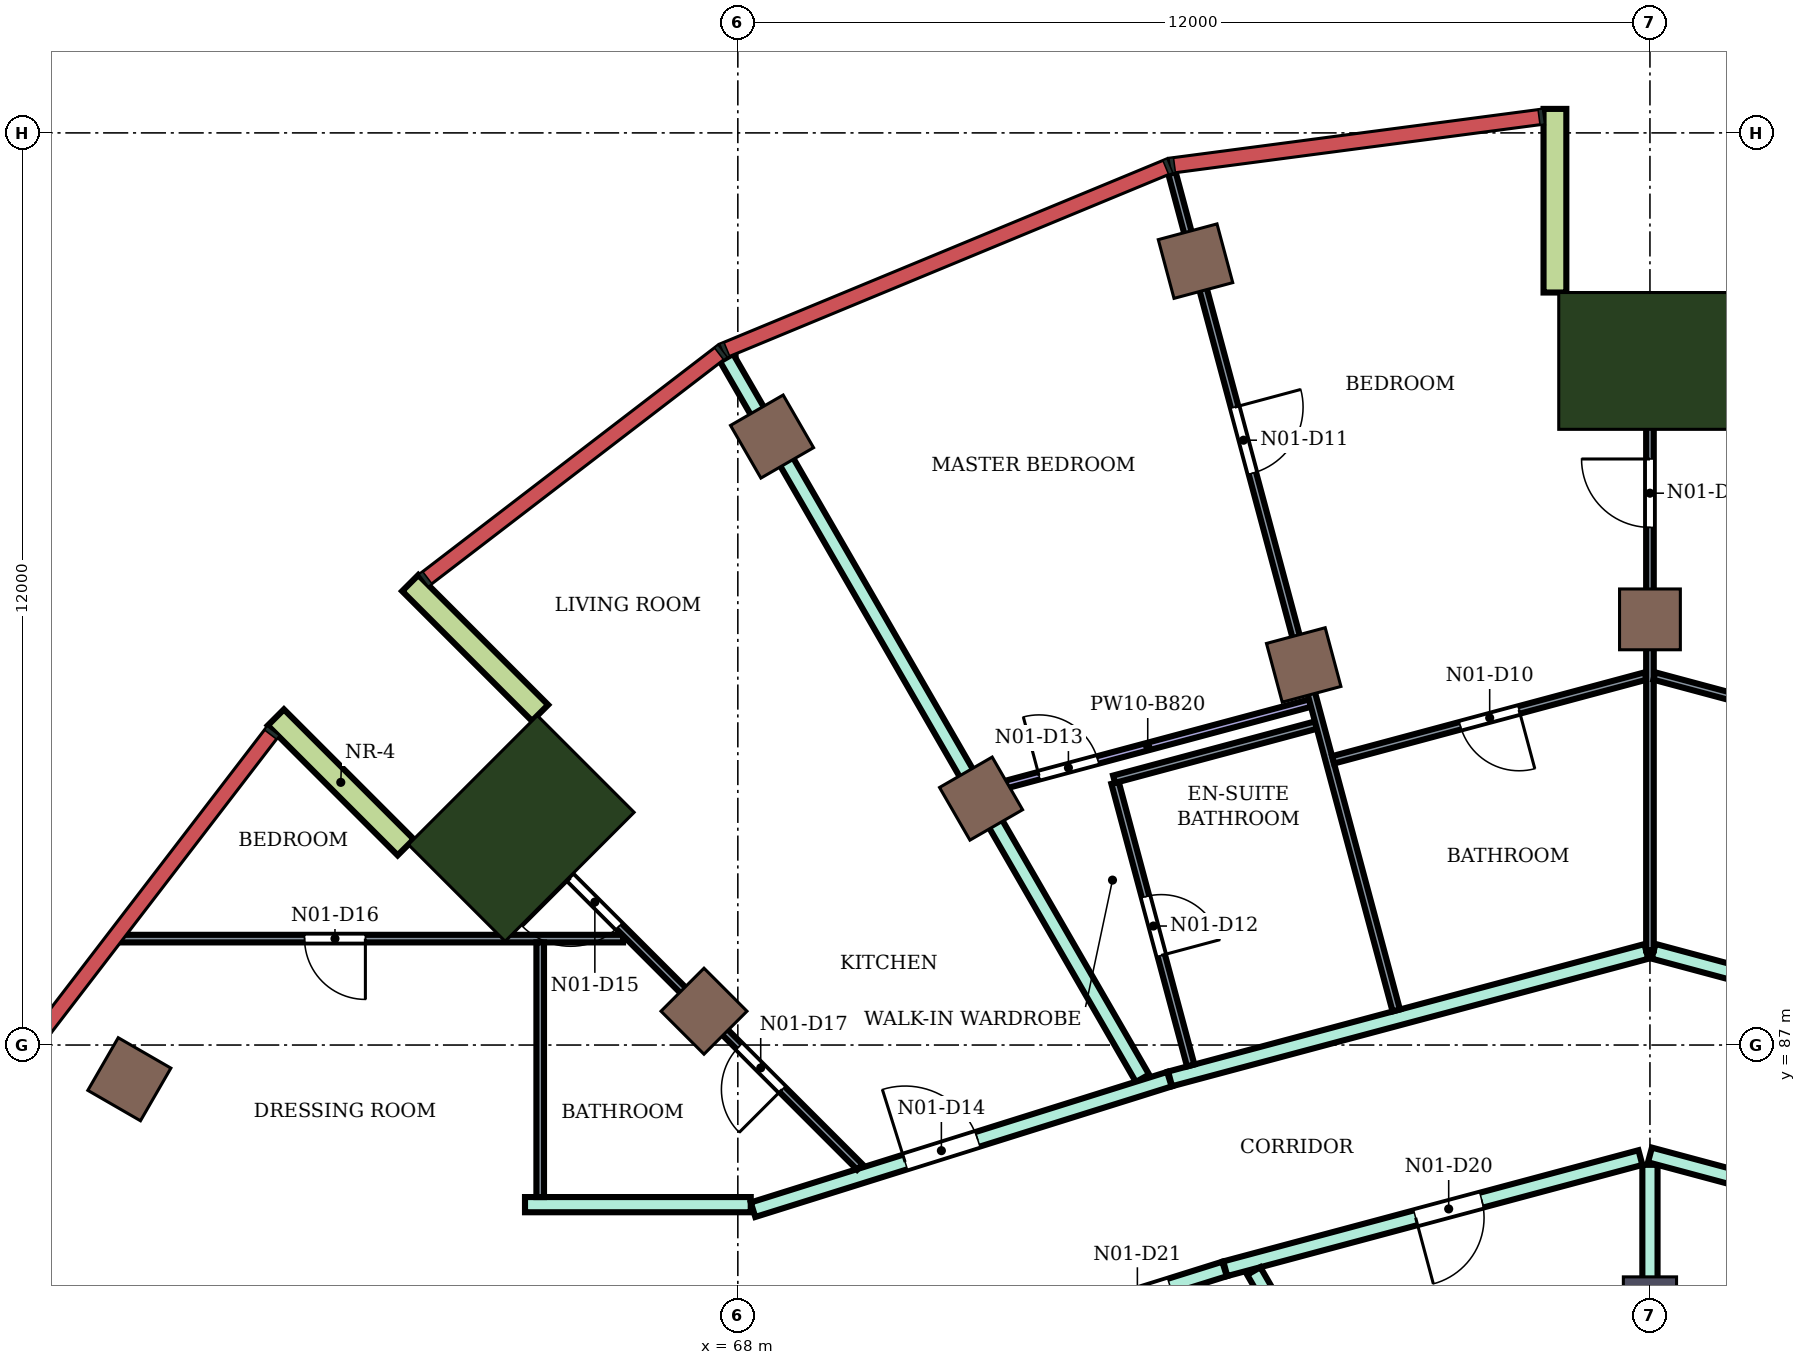
"""IFC4 building model, lengths in metres.
Left out: names, types, materials, properties, quantities, classifications, styles, units other than length and angle.
Written with IfcOpenShell. Run it as: python <this file> out.ifc"""

import sys

from ifc_helpers import new_model, si_unit, direction, frame, frame_2d, origin, origin_2d, place, context, subcontext, project, spatial, rectangle, extrude, element, fill, save


model = new_model("IFC4")
c1 = context("Model", 3, precision=1e-05, world=origin(), true_north=direction((0.0, 1.0)))
c2 = subcontext(c1, "Body", "Model", "MODEL_VIEW")
j1 = project(units=[si_unit("LENGTHUNIT", "METRE"), si_unit("PLANEANGLEUNIT", "RADIAN")], contexts=[c1])
p1 = place(None, origin())
s1 = spatial("IfcSite", under=j1, at=p1, CompositionType="ELEMENT")
p2 = place(p1, origin())
s2 = spatial("IfcBuilding", under=s1, at=p2, CompositionType="ELEMENT")
p3 = place(p2, frame((0.0, 0.0, 284.1)))
s3 = spatial("IfcBuildingStorey", under=s2, at=p3, CompositionType="ELEMENT", Elevation=284.1)
for number, where, z_axis, x_axis in (
    (1, (74.021, 97.313, 0.0), (0.0, 0.0, 1.0), (-0.259, 0.966, 0.0)),
    (2, (68.45, 95.005, 0.0), (0.0, 0.0, 1.0), (-0.5, 0.866, 0.0)),
    (3, (59.995, 86.55, 0.0), (0.0, 0.0, 1.0), (-0.866, 0.5, 0.0)),
    (4, (80.0, 92.6, 0.0), (0.0, 0.0, 1.0), (0.0, 1.0, 0.0)),
    (5, (75.445, 92.0, 0.0), (0.0, 0.0, 1.0), (-0.259, 0.966, 0.0)),
    (6, (71.2, 90.242, 0.0), (0.0, 0.0, 1.0), (-0.5, 0.866, 0.0)),
    (7, (67.555, 87.445, 0.0), (0.0, 0.0, 1.0), (-0.707, 0.707, 0.0)),
):
    element("IfcColumn", number, at=place(p3, frame(where, z_axis=z_axis, x_axis=x_axis)), inside=s3, PredefinedType="COLUMN", context=c2, shape_type="SweptSolid", body=[
        extrude(rectangle(XDim=0.8, YDim=0.8, at=origin_2d()), origin(), (0.0, 0.0, 1.0), 4.2),
    ])
p4 = place(p3, frame((80.0, 83.6, 0.0), z_axis=(0.0, 0.0, 1.0), x_axis=(0.0, 1.0, 0.0)))
e8 = element("IfcColumn", 8, at=p4, inside=s3, PredefinedType="COLUMN", context=c2, shape_type="SweptSolid", body=[
    extrude(rectangle(XDim=0.7, YDim=0.7, at=origin_2d()), origin(), (0.0, 0.0, 1.0), 4.2),
])
for number, where, z_axis, x_axis in (
    (9, (80.0, 96.0, 0.0), (0.0, 0.0, 1.0), (0.0, 1.0, 0.0)),
    (10, (65.151, 89.849, 0.0), (0.0, 0.0, 1.0), (-0.707, 0.707, 0.0)),
):
    element("IfcColumn", number, at=place(p3, frame(where, z_axis=z_axis, x_axis=x_axis)), inside=s3, PredefinedType="COLUMN", context=c2, shape_type="SweptSolid", body=[
        extrude(rectangle(XDim=1.8, YDim=2.4, at=origin_2d()), origin(), (0.0, 0.0, 1.0), 4.2),
    ])
p5 = place(p3, frame((78.75, 96.9, 0.0), z_axis=(0.0, 0.0, 1.0), x_axis=(0.0, 1.0, 0.0)))
e11 = element("IfcWall", 11, at=p5, inside=s3, PredefinedType="NOTDEFINED", context=c2, shape_type="SweptSolid", body=[
    extrude(rectangle(XDim=2.416, YDim=0.3, at=frame_2d((1.208, 0.0))), origin(), (0.0, 0.0, 1.0), 4.2),
])
for number, where, z_axis, x_axis in (
    (12, (65.398, 91.37, 0.0), (0.0, 0.0, 1.0), (-0.707, 0.707, 0.0)),
    (13, (63.63, 89.602, 0.0), (0.0, 0.0, 1.0), (-0.707, 0.707, 0.0)),
):
    element("IfcWall", number, at=place(p3, frame(where, z_axis=z_axis, x_axis=x_axis)), inside=s3, PredefinedType="NOTDEFINED", context=c2, shape_type="SweptSolid", body=[
        extrude(rectangle(XDim=2.416, YDim=0.3, at=frame_2d((1.208, 0.0))), origin(), (0.0, 0.0, 1.0), 4.2),
    ])
p6 = place(p3, frame((65.2, 84.9, 0.0), z_axis=(0.0, 0.0, 1.0), x_axis=(1.0, 0.0, 0.0)))
e14 = element("IfcWall", 14, at=p6, inside=s3, PredefinedType="PARTITIONING", context=c2, shape_type="SweptSolid", body=[
    extrude(rectangle(XDim=2.97, YDim=0.2, at=frame_2d((1.485, 0.0))), origin(), (0.0, 0.0, 1.0), 3.75),
])
p7 = place(p3, frame((67.852, 96.042, 0.0), z_axis=(0.0, 0.0, 1.0), x_axis=(0.499960582802, -0.866048160118, 0.0)))
e15 = element("IfcWall", 15, at=p7, inside=s3, PredefinedType="PARTITIONING", context=c2, shape_type="SweptSolid", body=[
    extrude(rectangle(XDim=10.946, YDim=0.2, at=frame_2d((5.473, 0.0))), origin(), (0.0, 0.0, 1.0), 3.75),
])
p8 = place(p3, frame((68.2, 84.833, 0.0), z_axis=(0.0, 0.0, 1.0), x_axis=(0.954191968402, 0.299195065863, 0.0)))
e16 = element("IfcWall", 16, at=p8, inside=s3, PredefinedType="PARTITIONING", context=c2, shape_type="SweptSolid", body=[
    extrude(rectangle(XDim=5.74, YDim=0.2, at=frame_2d((2.87, 0.0))), origin(), (0.0, 0.0, 1.0), 3.75),
])
p9 = place(p8, frame((2.097, 0.0, 0.0)))
e17 = element("IfcOpeningElement", 17, at=p9, cuts=e16, PredefinedType="OPENING", context=c2, shape_type="SweptSolid", body=[
    extrude(rectangle(XDim=1.0, YDim=2.1, at=frame_2d((0.5, 1.05))), frame((0.0, 0.11, 0.0), z_axis=(0.0, -1.0, 0.0), x_axis=(1.0, 0.0, 0.0)), (0.0, 0.0, 1.0), 0.22),
])
p10 = place(p3, frame((72.1, 83.332, 0.0), z_axis=(0.0, 0.0, 1.0), x_axis=(0.954233106619, 0.299063836383, 0.0)))
e18 = element("IfcWall", 18, at=p10, inside=s3, PredefinedType="PARTITIONING", context=c2, shape_type="SweptSolid", body=[
    extrude(rectangle(XDim=2.414, YDim=0.2, at=frame_2d((1.207, 0.0))), origin(), (0.0, 0.0, 1.0), 3.75),
])
p11 = place(p10, frame((0.762, 0.0, 0.0)))
e19 = element("IfcOpeningElement", 19, at=p11, cuts=e18, PredefinedType="OPENING", context=c2, shape_type="SweptSolid", body=[
    extrude(rectangle(XDim=0.9, YDim=2.1, at=frame_2d((0.45, 1.05))), frame((0.0, 0.11, 0.0), z_axis=(0.0, -1.0, 0.0), x_axis=(1.0, 0.0, 0.0)), (0.0, 0.0, 1.0), 0.22),
])
p12 = place(p3, frame((73.687, 86.554, 0.0), z_axis=(0.0, 0.0, 1.0), x_axis=(0.966002126521, 0.258534120682, 0.0)))
e20 = element("IfcWall", 20, at=p12, inside=s3, PredefinedType="PARTITIONING", context=c2, shape_type="SweptSolid", body=[
    extrude(rectangle(XDim=6.486, YDim=0.2, at=frame_2d((3.243, 0.0))), origin(), (0.0, 0.0, 1.0), 3.75),
])
p13 = place(p3, frame((74.413, 84.057, 0.0), z_axis=(0.0, 0.0, 1.0), x_axis=(0.965972135939, 0.258646153246, 0.0)))
e21 = element("IfcWall", 21, at=p13, inside=s3, PredefinedType="PARTITIONING", context=c2, shape_type="SweptSolid", body=[
    extrude(rectangle(XDim=5.654, YDim=0.2, at=frame_2d((2.827, 0.0))), origin(), (0.0, 0.0, 1.0), 3.75),
])
p14 = place(p13, frame((2.593, 0.0, 0.0)))
e22 = element("IfcOpeningElement", 22, at=p14, cuts=e21, PredefinedType="OPENING", context=c2, shape_type="SweptSolid", body=[
    extrude(rectangle(XDim=0.9, YDim=2.1, at=frame_2d((0.45, 1.05))), frame((0.0, 0.11, 0.0), z_axis=(0.0, -1.0, 0.0), x_axis=(1.0, 0.0, 0.0)), (0.0, 0.0, 1.0), 0.22),
])
p15 = place(p3, frame((74.788, 84.027, 0.0), z_axis=(0.0, 0.0, 1.0), x_axis=(0.49997314572, -0.866040907555, 0.0)))
e23 = element("IfcWall", 23, at=p15, inside=s3, PredefinedType="PARTITIONING", context=c2, shape_type="SweptSolid", body=[
    extrude(rectangle(XDim=2.726, YDim=0.2, at=frame_2d((1.363, 0.0))), origin(), (0.0, 0.0, 1.0), 3.75),
])
p16 = place(p3, frame((80.0, 82.699, 0.0), z_axis=(0.0, 0.0, 1.0), x_axis=(0.0, 1.0, 0.0)))
e24 = element("IfcWall", 24, at=p16, inside=s3, PredefinedType="PARTITIONING", context=c2, shape_type="SweptSolid", body=[
    extrude(rectangle(XDim=2.725, YDim=0.2, at=frame_2d((1.363, 0.0))), origin(), (0.0, 0.0, 1.0), 3.75),
])
p17 = place(p3, frame((80.0, 85.554, 0.0), z_axis=(0.0, 0.0, 1.0), x_axis=(0.965928989968, -0.258807237802, 0.0)))
e25 = element("IfcWall", 25, at=p17, inside=s3, PredefinedType="PARTITIONING", context=c2, shape_type="SweptSolid", body=[
    extrude(rectangle(XDim=5.774, YDim=0.2, at=frame_2d((2.887, 0.0))), origin(), (0.0, 0.0, 1.0), 3.75),
])
p18 = place(p17, frame((2.292, 0.0, 0.0)))
e26 = element("IfcOpeningElement", 26, at=p18, cuts=e25, PredefinedType="OPENING", context=c2, shape_type="SweptSolid", body=[
    extrude(rectangle(XDim=0.9, YDim=2.1, at=frame_2d((0.45, 1.05))), frame((0.0, 0.11, 0.0), z_axis=(0.0, -1.0, 0.0), x_axis=(1.0, 0.0, 0.0)), (0.0, 0.0, 1.0), 0.22),
])
p19 = place(p3, frame((80.048, 88.233, 0.0), z_axis=(0.0, 0.0, 1.0), x_axis=(0.965865387308, -0.259044501198, 0.0)))
e27 = element("IfcWall", 27, at=p19, inside=s3, PredefinedType="PARTITIONING", context=c2, shape_type="SweptSolid", body=[
    extrude(rectangle(XDim=6.476, YDim=0.2, at=frame_2d((3.238, 0.0))), origin(), (0.0, 0.0, 1.0), 3.75),
])
p20 = place(p19, frame((4.936, 0.0, 0.0)))
e28 = element("IfcOpeningElement", 28, at=p20, cuts=e27, PredefinedType="OPENING", context=c2, shape_type="SweptSolid", body=[
    extrude(rectangle(XDim=1.0, YDim=2.1, at=frame_2d((0.5, 1.05))), frame((0.0, 0.11, 0.0), z_axis=(0.0, -1.0, 0.0), x_axis=(1.0, 0.0, 0.0)), (0.0, 0.0, 1.0), 0.22),
])
p21 = place(p3, frame((59.87, 88.4, 0.0), z_axis=(0.0, 0.0, 1.0), x_axis=(1.0, 0.0, 0.0)))
e29 = element("IfcWall", 29, at=p21, inside=s3, PredefinedType="PARTITIONING", context=c2, shape_type="SweptSolid", body=[
    extrude(rectangle(XDim=6.62, YDim=0.1, at=frame_2d((3.31, 0.0))), origin(), (0.0, 0.0, 1.0), 3.75),
])
p22 = place(p21, frame((2.43, 0.0, 0.0)))
e30 = element("IfcOpeningElement", 30, at=p22, cuts=e29, PredefinedType="OPENING", context=c2, shape_type="SweptSolid", body=[
    extrude(rectangle(XDim=0.8, YDim=2.1, at=frame_2d((0.4, 1.05))), frame((0.0, 0.06, 0.0), z_axis=(0.0, -1.0, 0.0), x_axis=(1.0, 0.0, 0.0)), (0.0, 0.0, 1.0), 0.12),
])
p23 = place(p3, frame((64.656, 90.344, 0.0), z_axis=(0.0, 0.0, 1.0), x_axis=(0.707106781187, -0.707106781187, 0.0)))
e31 = element("IfcWall", 31, at=p23, inside=s3, PredefinedType="PARTITIONING", context=c2, shape_type="SweptSolid", body=[
    extrude(rectangle(XDim=7.0, YDim=0.1, at=frame_2d((3.5, 0.0))), origin(), (0.0, 0.0, 1.0), 3.75),
])
p24 = place(p23, frame((1.619, 0.0, 0.0)))
e32 = element("IfcOpeningElement", 32, at=p24, cuts=e31, PredefinedType="OPENING", context=c2, shape_type="SweptSolid", body=[
    extrude(rectangle(XDim=0.9, YDim=2.1, at=frame_2d((0.45, 1.05))), frame((0.0, 0.06, 0.0), z_axis=(0.0, -1.0, 0.0), x_axis=(1.0, 0.0, 0.0)), (0.0, 0.0, 1.0), 0.12),
])
p25 = place(p23, frame((4.755, 0.0, 0.0)))
e33 = element("IfcOpeningElement", 33, at=p25, cuts=e31, PredefinedType="OPENING", context=c2, shape_type="SweptSolid", body=[
    extrude(rectangle(XDim=0.8, YDim=2.1, at=frame_2d((0.4, 1.05))), frame((0.0, 0.06, 0.0), z_axis=(0.0, -1.0, 0.0), x_axis=(1.0, 0.0, 0.0)), (0.0, 0.0, 1.0), 0.12),
])
p26 = place(p3, frame((65.4, 85.0, 0.0), z_axis=(0.0, 0.0, 1.0), x_axis=(0.0, 1.0, 0.0)))
e34 = element("IfcWall", 34, at=p26, inside=s3, PredefinedType="PARTITIONING", context=c2, shape_type="SweptSolid", body=[
    extrude(rectangle(XDim=3.35, YDim=0.1, at=frame_2d((1.675, 0.0))), origin(), (0.0, 0.0, 1.0), 3.75),
])
p27 = place(p3, frame((71.258, 90.354, 0.0), z_axis=(0.0, 0.0, 1.0), x_axis=(0.965955692548, 0.258707556973, 0.0)))
e35 = element("IfcWall", 35, at=p27, inside=s3, PredefinedType="PARTITIONING", context=c2, shape_type="SweptSolid", body=[
    extrude(rectangle(XDim=4.42, YDim=0.1, at=frame_2d((2.21, 0.0))), origin(), (0.0, 0.0, 1.0), 3.38),
])
p28 = place(p27, frame((0.73, 0.0, 0.0)))
e36 = element("IfcOpeningElement", 36, at=p28, cuts=e35, PredefinedType="OPENING", context=c2, shape_type="SweptSolid", body=[
    extrude(rectangle(XDim=0.8, YDim=2.1, at=frame_2d((0.4, 1.05))), frame((0.0, 0.06, 0.0), z_axis=(0.0, -1.0, 0.0), x_axis=(1.0, 0.0, 0.0)), (0.0, 0.0, 1.0), 0.12),
])
p29 = place(p3, frame((72.963, 90.449, 0.0), z_axis=(0.0, 0.0, 1.0), x_axis=(0.25854689918, -0.965998706482, 0.0)))
e37 = element("IfcWall", 37, at=p29, inside=s3, PredefinedType="PARTITIONING", context=c2, shape_type="SweptSolid", body=[
    extrude(rectangle(XDim=3.849, YDim=0.1, at=frame_2d((1.924, 0.0))), origin(), (0.0, 0.0, 1.0), 3.75),
])
p30 = place(p29, frame((1.55, 0.0, 0.0)))
e38 = element("IfcOpeningElement", 38, at=p30, cuts=e37, PredefinedType="OPENING", context=c2, shape_type="SweptSolid", body=[
    extrude(rectangle(XDim=0.8, YDim=2.1, at=frame_2d((0.4, 1.05))), frame((0.0, 0.06, 0.0), z_axis=(0.0, -1.0, 0.0), x_axis=(1.0, 0.0, 0.0)), (0.0, 0.0, 1.0), 0.12),
])
p31 = place(p3, frame((72.95, 90.497, 0.0), z_axis=(0.0, 0.0, 1.0), x_axis=(0.96588619323, 0.258966912418, 0.0)))
e39 = element("IfcWall", 39, at=p31, inside=s3, PredefinedType="PARTITIONING", context=c2, shape_type="SweptSolid", body=[
    extrude(rectangle(XDim=2.749, YDim=0.1, at=frame_2d((1.375, 0.0))), origin(), (0.0, 0.0, 1.0), 3.75),
])
p32 = place(p3, frame((73.712, 98.47, 0.0), z_axis=(0.0, 0.0, 1.0), x_axis=(0.258727167471, -0.965950440143, 0.0)))
e40 = element("IfcWall", 40, at=p32, inside=s3, PredefinedType="PARTITIONING", context=c2, shape_type="SweptSolid", body=[
    extrude(rectangle(XDim=11.404, YDim=0.1, at=frame_2d((5.702, 0.0))), origin(), (0.0, 0.0, 1.0), 3.75),
])
p33 = place(p32, frame((3.187, 0.0, 0.0)))
e41 = element("IfcOpeningElement", 41, at=p33, cuts=e40, PredefinedType="OPENING", context=c2, shape_type="SweptSolid", body=[
    extrude(rectangle(XDim=0.9, YDim=2.1, at=frame_2d((0.45, 1.05))), frame((0.0, 0.06, 0.0), z_axis=(0.0, -1.0, 0.0), x_axis=(1.0, 0.0, 0.0)), (0.0, 0.0, 1.0), 0.12),
])
p34 = place(p3, frame((75.832, 90.752, 0.0), z_axis=(0.0, 0.0, 1.0), x_axis=(0.965856843682, 0.259076354601, 0.0)))
e42 = element("IfcWall", 42, at=p34, inside=s3, PredefinedType="PARTITIONING", context=c2, shape_type="SweptSolid", body=[
    extrude(rectangle(XDim=4.256, YDim=0.1, at=frame_2d((2.128, 0.0))), origin(), (0.0, 0.0, 1.0), 3.75),
])
p35 = place(p34, frame((1.733, 0.0, 0.0)))
e43 = element("IfcOpeningElement", 43, at=p35, cuts=e42, PredefinedType="OPENING", context=c2, shape_type="SweptSolid", body=[
    extrude(rectangle(XDim=0.8, YDim=2.1, at=frame_2d((0.4, 1.05))), frame((0.0, 0.06, 0.0), z_axis=(0.0, -1.0, 0.0), x_axis=(1.0, 0.0, 0.0)), (0.0, 0.0, 1.0), 0.12),
])
p36 = place(p3, frame((80.0, 88.246, 0.0), z_axis=(0.0, 0.0, 1.0), x_axis=(0.0, 1.0, 0.0)))
e44 = element("IfcWall", 44, at=p36, inside=s3, PredefinedType="PARTITIONING", context=c2, shape_type="SweptSolid", body=[
    extrude(rectangle(XDim=8.454, YDim=0.1, at=frame_2d((4.227, 0.0))), origin(), (0.0, 0.0, 1.0), 3.75),
])
p37 = place(p36, frame((5.564, 0.0, 0.0)))
e45 = element("IfcOpeningElement", 45, at=p37, cuts=e44, PredefinedType="OPENING", context=c2, shape_type="SweptSolid", body=[
    extrude(rectangle(XDim=0.9, YDim=2.1, at=frame_2d((0.45, 1.05))), frame((0.0, 0.06, 0.0), z_axis=(0.0, -1.0, 0.0), x_axis=(1.0, 0.0, 0.0)), (0.0, 0.0, 1.0), 0.12),
])
p38 = place(p3, frame((80.058, 91.854, 0.0), z_axis=(0.0, 0.0, 1.0), x_axis=(0.96586069397, -0.259061999998, 0.0)))
e46 = element("IfcWall", 46, at=p38, inside=s3, PredefinedType="PARTITIONING", context=c2, shape_type="SweptSolid", body=[
    extrude(rectangle(XDim=4.256, YDim=0.1, at=frame_2d((2.128, 0.0))), origin(), (0.0, 0.0, 1.0), 3.75),
])
p39 = place(p37, origin())
e47 = element("IfcDoor", 47, at=p39, inside=s3, OperationType="SINGLE_SWING_RIGHT", PredefinedType="DOOR", context=c2, shape_type="SweptSolid", body=[
    extrude(rectangle(XDim=0.9, YDim=2.1, at=frame_2d((0.45, 1.05))), frame((0.0, 0.025, 0.0), z_axis=(0.0, -1.0, 0.0), x_axis=(1.0, 0.0, 0.0)), (0.0, 0.0, 1.0), 0.05),
])
fill(e45, e47)
p40 = place(p35, frame((0.8, 0.0, 0.0), z_axis=(0.0, 0.0, 1.0), x_axis=(-1.0, 0.0, 0.0)))
e48 = element("IfcDoor", 48, at=p40, inside=s3, OperationType="SINGLE_SWING_LEFT", PredefinedType="DOOR", context=c2, shape_type="SweptSolid", body=[
    extrude(rectangle(XDim=0.8, YDim=2.1, at=frame_2d((0.4, 1.05))), frame((0.0, 0.025, 0.0), z_axis=(0.0, -1.0, 0.0), x_axis=(1.0, 0.0, 0.0)), (0.0, 0.0, 1.0), 0.05),
])
fill(e43, e48)
p41 = place(p33, origin())
e49 = element("IfcDoor", 49, at=p41, inside=s3, OperationType="SINGLE_SWING_LEFT", PredefinedType="DOOR", context=c2, shape_type="SweptSolid", body=[
    extrude(rectangle(XDim=0.9, YDim=2.1, at=frame_2d((0.45, 1.05))), frame((0.0, 0.025, 0.0), z_axis=(0.0, -1.0, 0.0), x_axis=(1.0, 0.0, 0.0)), (0.0, 0.0, 1.0), 0.05),
])
fill(e41, e49)
p42 = place(p30, origin())
e50 = element("IfcDoor", 50, at=p42, inside=s3, OperationType="SINGLE_SWING_RIGHT", PredefinedType="DOOR", context=c2, shape_type="SweptSolid", body=[
    extrude(rectangle(XDim=0.8, YDim=2.1, at=frame_2d((0.4, 1.05))), frame((0.0, 0.025, 0.0), z_axis=(0.0, -1.0, 0.0), x_axis=(1.0, 0.0, 0.0)), (0.0, 0.0, 1.0), 0.05),
])
fill(e38, e50)
p43 = place(p28, origin())
e51 = element("IfcDoor", 51, at=p43, inside=s3, OperationType="SINGLE_SWING_LEFT", PredefinedType="DOOR", context=c2, shape_type="SweptSolid", body=[
    extrude(rectangle(XDim=0.8, YDim=2.1, at=frame_2d((0.4, 1.05))), frame((0.0, 0.025, 0.0), z_axis=(0.0, -1.0, 0.0), x_axis=(1.0, 0.0, 0.0)), (0.0, 0.0, 1.0), 0.05),
])
fill(e36, e51)
p44 = place(p9, origin())
e52 = element("IfcDoor", 52, at=p44, inside=s3, OperationType="SINGLE_SWING_LEFT", PredefinedType="DOOR", context=c2, shape_type="SweptSolid", body=[
    extrude(rectangle(XDim=1.0, YDim=2.1, at=frame_2d((0.5, 1.05))), frame((0.0, 0.025, 0.0), z_axis=(0.0, -1.0, 0.0), x_axis=(1.0, 0.0, 0.0)), (0.0, 0.0, 1.0), 0.05),
])
fill(e17, e52)
p45 = place(p24, frame((0.9, 0.0, 0.0), z_axis=(0.0, 0.0, 1.0), x_axis=(-1.0, 0.0, 0.0)))
e53 = element("IfcDoor", 53, at=p45, inside=s3, OperationType="SINGLE_SWING_RIGHT", PredefinedType="DOOR", context=c2, shape_type="SweptSolid", body=[
    extrude(rectangle(XDim=0.9, YDim=2.1, at=frame_2d((0.45, 1.05))), frame((0.0, 0.025, 0.0), z_axis=(0.0, -1.0, 0.0), x_axis=(1.0, 0.0, 0.0)), (0.0, 0.0, 1.0), 0.05),
])
fill(e32, e53)
p46 = place(p22, frame((0.8, 0.0, 0.0), z_axis=(0.0, 0.0, 1.0), x_axis=(-1.0, 0.0, 0.0)))
e54 = element("IfcDoor", 54, at=p46, inside=s3, OperationType="SINGLE_SWING_LEFT", PredefinedType="DOOR", context=c2, shape_type="SweptSolid", body=[
    extrude(rectangle(XDim=0.8, YDim=2.1, at=frame_2d((0.4, 1.05))), frame((0.0, 0.025, 0.0), z_axis=(0.0, -1.0, 0.0), x_axis=(1.0, 0.0, 0.0)), (0.0, 0.0, 1.0), 0.05),
])
fill(e30, e54)
p47 = place(p25, frame((0.8, 0.0, 0.0), z_axis=(0.0, 0.0, 1.0), x_axis=(-1.0, 0.0, 0.0)))
e55 = element("IfcDoor", 55, at=p47, inside=s3, OperationType="SINGLE_SWING_LEFT", PredefinedType="DOOR", context=c2, shape_type="SweptSolid", body=[
    extrude(rectangle(XDim=0.8, YDim=2.1, at=frame_2d((0.4, 1.05))), frame((0.0, 0.025, 0.0), z_axis=(0.0, -1.0, 0.0), x_axis=(1.0, 0.0, 0.0)), (0.0, 0.0, 1.0), 0.05),
])
fill(e33, e55)
p48 = place(p14, frame((0.9, 0.0, 0.0), z_axis=(0.0, 0.0, 1.0), x_axis=(-1.0, 0.0, 0.0)))
e56 = element("IfcDoor", 56, at=p48, inside=s3, OperationType="SINGLE_SWING_RIGHT", PredefinedType="DOOR", context=c2, shape_type="SweptSolid", body=[
    extrude(rectangle(XDim=0.9, YDim=2.1, at=frame_2d((0.45, 1.05))), frame((0.0, 0.025, 0.0), z_axis=(0.0, -1.0, 0.0), x_axis=(1.0, 0.0, 0.0)), (0.0, 0.0, 1.0), 0.05),
])
fill(e22, e56)
p49 = place(p11, frame((0.9, 0.0, 0.0), z_axis=(0.0, 0.0, 1.0), x_axis=(-1.0, 0.0, 0.0)))
e57 = element("IfcDoor", 57, at=p49, inside=s3, OperationType="SINGLE_SWING_RIGHT", PredefinedType="DOOR", context=c2, shape_type="SweptSolid", body=[
    extrude(rectangle(XDim=0.9, YDim=2.1, at=frame_2d((0.45, 1.05))), frame((0.0, 0.025, 0.0), z_axis=(0.0, -1.0, 0.0), x_axis=(1.0, 0.0, 0.0)), (0.0, 0.0, 1.0), 0.05),
])
fill(e19, e57)
save(model, sys.argv[1])
